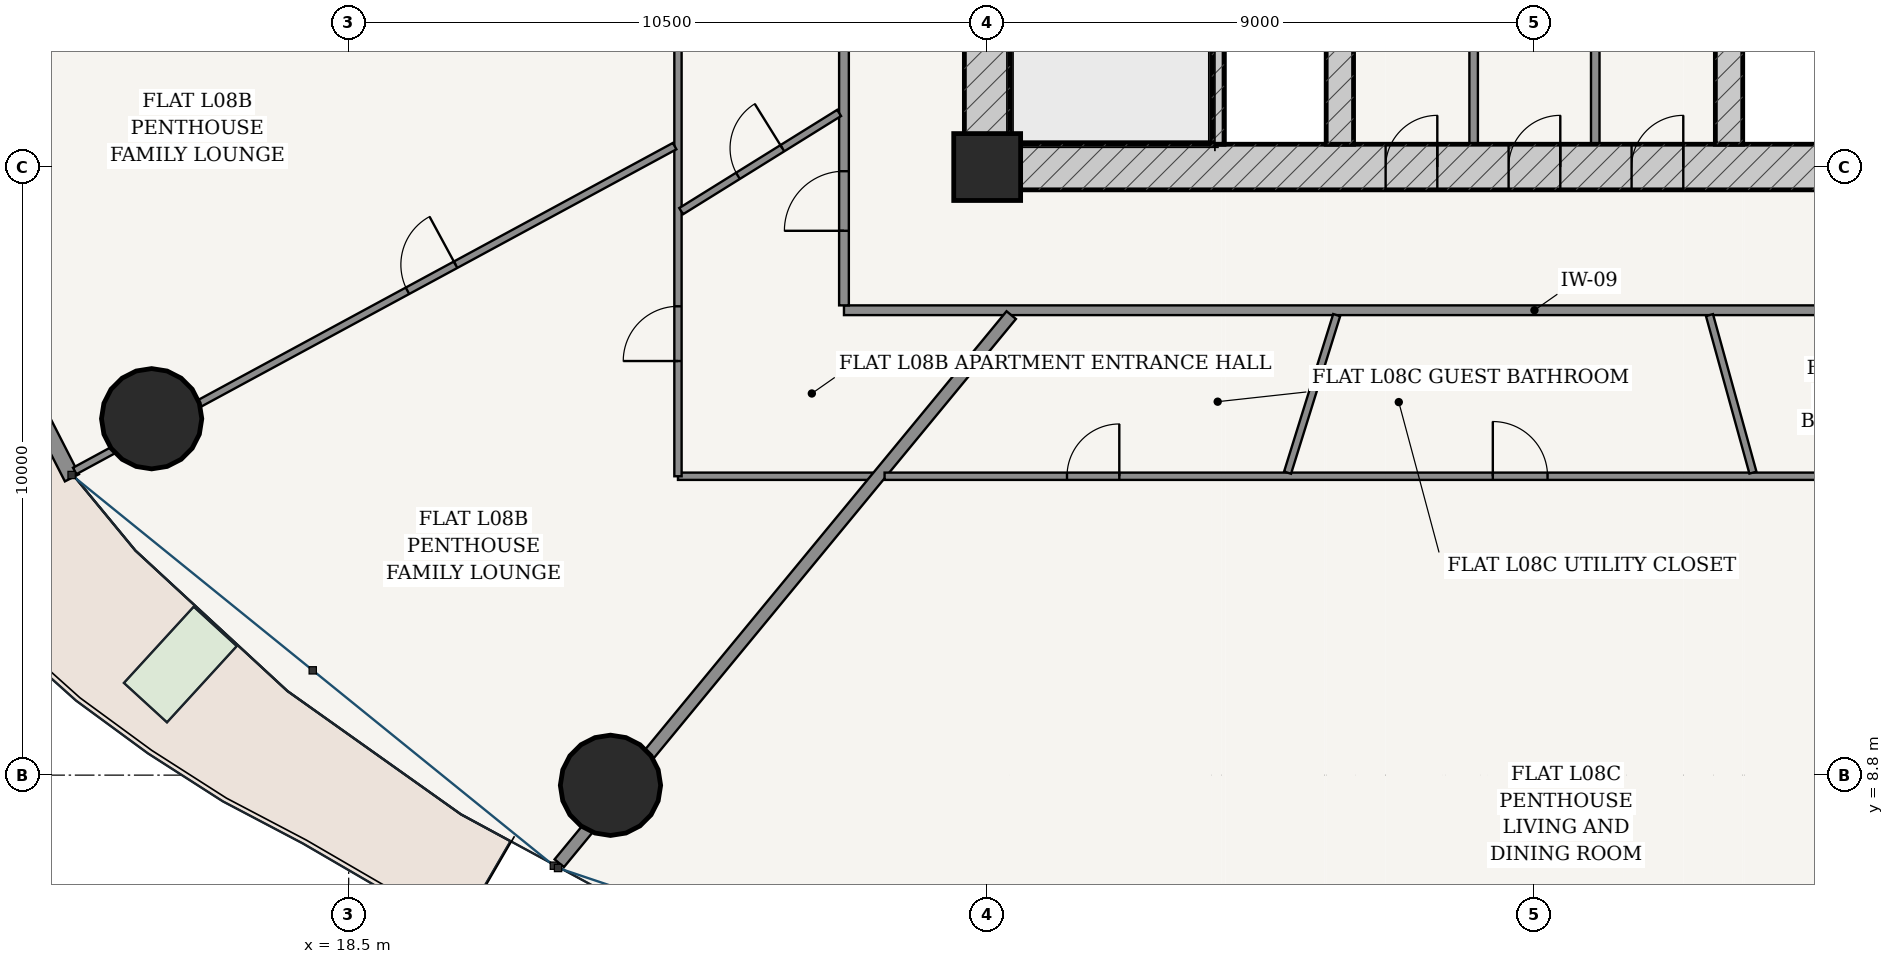
"""IFC4 building model, lengths in metres.
Left out: names, types, materials, properties, quantities, classifications, styles, units other than length and angle.
Written with IfcOpenShell. Run it as: python <this file> out.ifc"""

import sys

from ifc_helpers import new_model, si_unit, direction, frame, frame_2d, origin, origin_2d, place, context, subcontext, project, spatial, rectangle, hollow_circle, extrude, source, transform, mapped, element, fill, save


model = new_model("IFC4")
c1 = context("Model", 3, precision=1e-05, world=origin(), true_north=direction((-0.2419218956, 0.970295726276)))
c2 = subcontext(c1, "Body", "Model", "MODEL_VIEW")
j1 = project(units=[si_unit("LENGTHUNIT", "METRE"), si_unit("PLANEANGLEUNIT", "RADIAN")], contexts=[c1])
p1 = place(None, origin())
s1 = spatial("IfcSite", under=j1, at=p1, CompositionType="ELEMENT")
p2 = place(p1, origin())
s2 = spatial("IfcBuilding", under=s1, at=p2, CompositionType="ELEMENT")
p3 = place(p2, frame((0.0, 0.0, 34.8)))
s3 = spatial("IfcBuildingStorey", under=s2, at=p3, CompositionType="ELEMENT", Elevation=34.8)
p4 = place(p3, frame((29.0, 18.8, 0.0), z_axis=(0.0, 0.0, 1.0), x_axis=(1.0, 0.0, 0.0)))
e1 = element("IfcColumn", 1, at=p4, inside=s3, PredefinedType="COLUMN", context=c2, shape_type="SweptSolid", body=[
    extrude(rectangle(XDim=1.1, YDim=1.1, at=origin_2d()), origin(), (0.0, 0.0, 1.0), 3.6),
])
p5 = place(p3, frame((28.625, 18.8, 0.0), z_axis=(0.0, 0.0, 1.0), x_axis=(1.0, 0.0, 0.0)))
e2 = element("IfcWall", 2, at=p5, inside=s3, PredefinedType="SHEAR", context=c2, shape_type="SweptSolid", body=[
    extrude(rectangle(XDim=18.75, YDim=0.75, at=frame_2d((9.375, 0.0))), origin(), (0.0, 0.0, 1.0), 3.32),
])
p6 = place(p5, frame((6.927, 0.0, 0.0)))
e3 = element("IfcOpeningElement", 3, at=p6, cuts=e2, PredefinedType="OPENING", context=c2, shape_type="SweptSolid", body=[
    extrude(rectangle(XDim=0.85, YDim=2.1, at=frame_2d((0.425, 1.05))), frame((0.0, 0.385, 0.0), z_axis=(0.0, -1.0, 0.0), x_axis=(1.0, 0.0, 0.0)), (0.0, 0.0, 1.0), 0.77),
])
p7 = place(p5, frame((8.95, 0.0, 0.0)))
e4 = element("IfcOpeningElement", 4, at=p7, cuts=e2, PredefinedType="OPENING", context=c2, shape_type="SweptSolid", body=[
    extrude(rectangle(XDim=0.85, YDim=2.1, at=frame_2d((0.425, 1.05))), frame((0.0, 0.385, 0.0), z_axis=(0.0, -1.0, 0.0), x_axis=(1.0, 0.0, 0.0)), (0.0, 0.0, 1.0), 0.77),
])
p8 = place(p5, frame((10.972, 0.0, 0.0)))
e5 = element("IfcOpeningElement", 5, at=p8, cuts=e2, PredefinedType="OPENING", context=c2, shape_type="SweptSolid", body=[
    extrude(rectangle(XDim=0.85, YDim=2.1, at=frame_2d((0.425, 1.05))), frame((0.0, 0.385, 0.0), z_axis=(0.0, -1.0, 0.0), x_axis=(1.0, 0.0, 0.0)), (0.0, 0.0, 1.0), 0.77),
])
p9 = place(p3, frame((29.0, 19.175, 0.0), z_axis=(0.0, 0.0, 1.0), x_axis=(0.0, 1.0, 0.0)))
e6 = element("IfcWall", 6, at=p9, inside=s3, PredefinedType="SHEAR", context=c2, shape_type="SweptSolid", body=[
    extrude(rectangle(XDim=15.25, YDim=0.75, at=frame_2d((7.625, 0.0))), origin(), (0.0, 0.0, 1.0), 3.32),
])
p10 = place(p9, frame((9.875, 0.0, 0.0)))
e7 = element("IfcOpeningElement", 7, at=p10, cuts=e6, PredefinedType="OPENING", context=c2, shape_type="SweptSolid", body=[
    extrude(rectangle(XDim=1.5, YDim=2.2, at=frame_2d((0.75, 1.1))), frame((0.0, 0.385, 0.0), z_axis=(0.0, -1.0, 0.0), x_axis=(1.0, 0.0, 0.0)), (0.0, 0.0, 1.0), 0.77),
])
p11 = place(p3, frame((32.795, 19.175, 0.0), z_axis=(0.0, 0.0, 1.0), x_axis=(0.0, 1.0, 0.0)))
e8 = element("IfcWall", 8, at=p11, inside=s3, PredefinedType="SOLIDWALL", context=c2, shape_type="SweptSolid", body=[
    extrude(rectangle(XDim=7.375, YDim=0.2, at=frame_2d((3.688, 0.0))), origin(), (0.0, 0.0, 1.0), 3.32),
])
p12 = place(p3, frame((34.8, 19.175, 0.0), z_axis=(0.0, 0.0, 1.0), x_axis=(0.0, 1.0, 0.0)))
e9 = element("IfcWall", 9, at=p12, inside=s3, PredefinedType="SHEAR", context=c2, shape_type="SweptSolid", body=[
    extrude(rectangle(XDim=15.25, YDim=0.45, at=frame_2d((7.625, 0.0))), origin(), (0.0, 0.0, 1.0), 3.32),
])
p13 = place(p12, frame((7.8, 0.0, 0.0)))
e10 = element("IfcOpeningElement", 10, at=p13, cuts=e9, PredefinedType="OPENING", context=c2, shape_type="SweptSolid", body=[
    extrude(rectangle(XDim=1.05, YDim=2.15, at=frame_2d((0.525, 1.075))), frame((0.0, 0.235, 0.0), z_axis=(0.0, -1.0, 0.0), x_axis=(1.0, 0.0, 0.0)), (0.0, 0.0, 1.0), 0.47),
])
p14 = place(p3, frame((41.2, 19.175, 0.0), z_axis=(0.0, 0.0, 1.0), x_axis=(0.0, 1.0, 0.0)))
e11 = element("IfcWall", 11, at=p14, inside=s3, PredefinedType="SHEAR", context=c2, shape_type="SweptSolid", body=[
    extrude(rectangle(XDim=15.25, YDim=0.45, at=frame_2d((7.625, 0.0))), origin(), (0.0, 0.0, 1.0), 3.32),
])
p15 = place(p14, frame((7.8, 0.0, 0.0)))
e12 = element("IfcOpeningElement", 12, at=p15, cuts=e11, PredefinedType="OPENING", context=c2, shape_type="SweptSolid", body=[
    extrude(rectangle(XDim=1.05, YDim=2.15, at=frame_2d((0.525, 1.075))), frame((0.0, 0.235, 0.0), z_axis=(0.0, -1.0, 0.0), x_axis=(1.0, 0.0, 0.0)), (0.0, 0.0, 1.0), 0.47),
])
for number, where, z_axis, x_axis in (
    (13, (15.259, 14.661, 0.0), (0.0, 0.0, 1.0), (1.0, 0.0, 0.0)),
    (14, (22.805, 8.632, 0.0), (0.0, 0.0, 1.0), (1.0, 0.0, 0.0)),
):
    element("IfcColumn", number, at=place(p3, frame(where, z_axis=z_axis, x_axis=x_axis)), inside=s3, PredefinedType="COLUMN", context=c2, shape_type="SweptSolid", body=[
        extrude(hollow_circle(Radius=0.825, WallThickness=0.05, at=origin_2d()), origin(), (0.0, 0.0, 1.0), 3.6),
    ])
p16 = place(p3, frame((9.55, 22.292, 0.0), z_axis=(0.0, 0.0, 1.0), x_axis=(0.455220575541, -0.890378698984, 0.0)))
e15 = element("IfcWall", 15, at=p16, inside=s3, PredefinedType="SOLIDWALL", context=c2, shape_type="SweptSolid", body=[
    extrude(rectangle(XDim=9.662, YDim=0.26, at=frame_2d((4.831, 0.0))), origin(), (0.0, 0.0, 1.0), 3.32),
])
p17 = place(p16, frame((4.156, 0.0, 0.0)))
e16 = element("IfcOpeningElement", 16, at=p17, cuts=e15, PredefinedType="OPENING", context=c2, shape_type="SweptSolid", body=[
    extrude(rectangle(XDim=1.35, YDim=2.2, at=frame_2d((0.675, 1.1))), frame((0.0, 0.14, 0.0), z_axis=(0.0, -1.0, 0.0), x_axis=(1.0, 0.0, 0.0)), (0.0, 0.0, 1.0), 0.28),
])
p18 = place(p3, frame((37.0, 19.175, 0.0), z_axis=(0.0, 0.0, 1.0), x_axis=(0.0, 1.0, 0.0)))
e17 = element("IfcWall", 17, at=p18, inside=s3, PredefinedType="PARTITIONING", context=c2, shape_type="SweptSolid", body=[
    extrude(rectangle(XDim=4.465, YDim=0.14, at=frame_2d((2.232, 0.0))), origin(), (0.0, 0.0, 1.0), 3.32),
])
p19 = place(p18, frame((1.808, 0.0, 0.0)))
e18 = element("IfcOpeningElement", 18, at=p19, cuts=e17, PredefinedType="OPENING", context=c2, shape_type="SweptSolid", body=[
    extrude(rectangle(XDim=0.85, YDim=2.1, at=frame_2d((0.425, 1.05))), frame((0.0, 0.08, 0.0), z_axis=(0.0, -1.0, 0.0), x_axis=(1.0, 0.0, 0.0)), (0.0, 0.0, 1.0), 0.16),
])
p20 = place(p3, frame((39.0, 19.175, 0.0), z_axis=(0.0, 0.0, 1.0), x_axis=(0.0, 1.0, 0.0)))
e19 = element("IfcWall", 19, at=p20, inside=s3, PredefinedType="PARTITIONING", context=c2, shape_type="SweptSolid", body=[
    extrude(rectangle(XDim=4.465, YDim=0.14, at=frame_2d((2.232, 0.0))), origin(), (0.0, 0.0, 1.0), 3.32),
])
p21 = place(p20, frame((1.808, 0.0, 0.0)))
e20 = element("IfcOpeningElement", 20, at=p21, cuts=e19, PredefinedType="OPENING", context=c2, shape_type="SweptSolid", body=[
    extrude(rectangle(XDim=0.85, YDim=2.1, at=frame_2d((0.425, 1.05))), frame((0.0, 0.08, 0.0), z_axis=(0.0, -1.0, 0.0), x_axis=(1.0, 0.0, 0.0)), (0.0, 0.0, 1.0), 0.16),
])
p22 = place(p3, frame((26.645, 16.445, 0.0), z_axis=(0.0, 0.0, 1.0), x_axis=(1.0, 0.0, 0.0)))
e21 = element("IfcWall", 21, at=p22, inside=s3, PredefinedType="PARTITIONING", context=c2, shape_type="SweptSolid", body=[
    extrude(rectangle(XDim=22.71, YDim=0.16, at=frame_2d((11.355, 0.0))), origin(), (0.0, 0.0, 1.0), 2.688),
])
p23 = place(p3, frame((26.645, 16.525, 0.0), z_axis=(0.0, 0.0, 1.0), x_axis=(0.0, 1.0, 0.0)))
e22 = element("IfcWall", 22, at=p23, inside=s3, PredefinedType="PARTITIONING", context=c2, shape_type="SweptSolid", body=[
    extrude(rectangle(XDim=20.55, YDim=0.16, at=frame_2d((10.275, 0.0))), origin(), (0.0, 0.0, 1.0), 2.688),
])
p24 = place(p23, frame((1.226, 0.0, 0.0)))
e23 = element("IfcOpeningElement", 23, at=p24, cuts=e22, PredefinedType="OPENING", context=c2, shape_type="SweptSolid", body=[
    extrude(rectangle(XDim=0.98, YDim=2.2, at=frame_2d((0.49, 1.1))), frame((0.0, 0.09, 0.0), z_axis=(0.0, -1.0, 0.0), x_axis=(1.0, 0.0, 0.0)), (0.0, 0.0, 1.0), 0.18),
])
p25 = place(p3, frame((27.109, 13.715, 0.0), z_axis=(0.0, 0.0, 1.0), x_axis=(-1.0, 0.0, 0.0)))
e24 = element("IfcWall", 24, at=p25, inside=s3, PredefinedType="PARTITIONING", context=c2, shape_type="SweptSolid", body=[
    extrude(rectangle(XDim=3.194, YDim=0.12, at=frame_2d((1.597, 0.0))), origin(), (0.0, 0.0, 1.0), 2.688),
])
p26 = place(p3, frame((23.915, 13.715, 0.0), z_axis=(0.0, 0.0, 1.0), x_axis=(0.0, 1.0, 0.0)))
e25 = element("IfcWall", 25, at=p26, inside=s3, PredefinedType="PARTITIONING", context=c2, shape_type="SweptSolid", body=[
    extrude(rectangle(XDim=26.17, YDim=0.12, at=frame_2d((13.085, 0.0))), origin(), (0.0, 0.0, 1.0), 2.688),
])
p27 = place(p26, frame((1.895, 0.0, 0.0)))
e26 = element("IfcOpeningElement", 26, at=p27, cuts=e25, PredefinedType="OPENING", context=c2, shape_type="SweptSolid", body=[
    extrude(rectangle(XDim=0.9, YDim=2.15, at=frame_2d((0.45, 1.075))), frame((0.0, 0.07, 0.0), z_axis=(0.0, -1.0, 0.0), x_axis=(1.0, 0.0, 0.0)), (0.0, 0.0, 1.0), 0.14),
])
p28 = place(p26, frame((11.498, 0.0, 0.0)))
e27 = element("IfcOpeningElement", 27, at=p28, cuts=e25, PredefinedType="OPENING", context=c2, shape_type="SweptSolid", body=[
    extrude(rectangle(XDim=0.9, YDim=2.15, at=frame_2d((0.45, 1.075))), frame((0.0, 0.07, 0.0), z_axis=(0.0, -1.0, 0.0), x_axis=(1.0, 0.0, 0.0)), (0.0, 0.0, 1.0), 0.14),
])
p29 = place(p26, frame((23.831, 0.0, 0.0)))
e28 = element("IfcOpeningElement", 28, at=p29, cuts=e25, PredefinedType="OPENING", context=c2, shape_type="SweptSolid", body=[
    extrude(rectangle(XDim=0.86, YDim=2.15, at=frame_2d((0.43, 1.075))), frame((0.0, 0.07, 0.0), z_axis=(0.0, -1.0, 0.0), x_axis=(1.0, 0.0, 0.0)), (0.0, 0.0, 1.0), 0.14),
])
p30 = place(p3, frame((23.861, 19.144, 0.0), z_axis=(0.0, 0.0, 1.0), x_axis=(-0.879372452045, -0.476134529922, 0.0)))
e29 = element("IfcWall", 29, at=p30, inside=s3, PredefinedType="PARTITIONING", context=c2, shape_type="SweptSolid", body=[
    extrude(rectangle(XDim=11.219, YDim=0.12, at=frame_2d((5.61, 0.0))), origin(), (0.0, 0.0, 1.0), 2.688),
])
p31 = place(p30, frame((4.097, 0.0, 0.0)))
e30 = element("IfcOpeningElement", 30, at=p31, cuts=e29, PredefinedType="OPENING", context=c2, shape_type="SweptSolid", body=[
    extrude(rectangle(XDim=0.9, YDim=2.15, at=frame_2d((0.45, 1.075))), frame((0.0, 0.07, 0.0), z_axis=(0.0, -1.0, 0.0), x_axis=(1.0, 0.0, 0.0)), (0.0, 0.0, 1.0), 0.14),
])
p32 = place(p3, frame((26.565, 19.69, 0.0), z_axis=(0.0, 0.0, 1.0), x_axis=(-0.849229217796, -0.52802437031, 0.0)))
e31 = element("IfcWall", 31, at=p32, inside=s3, PredefinedType="PARTITIONING", context=c2, shape_type="SweptSolid", body=[
    extrude(rectangle(XDim=3.059, YDim=0.12, at=frame_2d((1.529, 0.0))), origin(), (0.0, 0.0, 1.0), 3.32),
])
p33 = place(p32, frame((1.099, 0.0, 0.0)))
e32 = element("IfcOpeningElement", 32, at=p33, cuts=e31, PredefinedType="OPENING", context=c2, shape_type="SweptSolid", body=[
    extrude(rectangle(XDim=0.86, YDim=2.15, at=frame_2d((0.43, 1.075))), frame((0.0, 0.07, 0.0), z_axis=(0.0, -1.0, 0.0), x_axis=(1.0, 0.0, 0.0)), (0.0, 0.0, 1.0), 0.14),
])
p34 = place(p3, frame((29.396, 16.365, 0.0), z_axis=(0.0, 0.0, 1.0), x_axis=(-0.636186165667, -0.771535587393, 0.0)))
e33 = element("IfcWall", 33, at=p34, inside=s3, PredefinedType="PARTITIONING", context=c2, shape_type="SweptSolid", body=[
    extrude(rectangle(XDim=11.683, YDim=0.2, at=frame_2d((5.842, 0.0))), origin(), (0.0, 0.0, 1.0), 2.688),
])
p35 = place(p3, frame((52.085, 13.715, 0.0), z_axis=(0.0, 0.0, 1.0), x_axis=(-1.0, 0.0, 0.0)))
e34 = element("IfcWall", 34, at=p35, inside=s3, PredefinedType="PARTITIONING", context=c2, shape_type="SweptSolid", body=[
    extrude(rectangle(XDim=24.772, YDim=0.12, at=frame_2d((12.386, 0.0))), origin(), (0.0, 0.0, 1.0), 2.688),
])
p36 = place(p35, frame((20.912, 0.0, 0.0)))
e35 = element("IfcOpeningElement", 35, at=p36, cuts=e34, PredefinedType="OPENING", context=c2, shape_type="SweptSolid", body=[
    extrude(rectangle(XDim=0.86, YDim=2.15, at=frame_2d((0.43, 1.075))), frame((0.0, 0.07, 0.0), z_axis=(0.0, -1.0, 0.0), x_axis=(1.0, 0.0, 0.0)), (0.0, 0.0, 1.0), 0.14),
])
p37 = place(p35, frame((13.87, 0.0, 0.0)))
e36 = element("IfcOpeningElement", 36, at=p37, cuts=e34, PredefinedType="OPENING", context=c2, shape_type="SweptSolid", body=[
    extrude(rectangle(XDim=0.9, YDim=2.15, at=frame_2d((0.45, 1.075))), frame((0.0, 0.07, 0.0), z_axis=(0.0, -1.0, 0.0), x_axis=(1.0, 0.0, 0.0)), (0.0, 0.0, 1.0), 0.14),
])
p38 = place(p3, frame((34.748, 16.365, 0.0), z_axis=(0.0, 0.0, 1.0), x_axis=(-0.297598752493, -0.954691040345, 0.0)))
e37 = element("IfcWall", 37, at=p38, inside=s3, PredefinedType="PARTITIONING", context=c2, shape_type="SweptSolid", body=[
    extrude(rectangle(XDim=2.714, YDim=0.12, at=frame_2d((1.357, 0.0))), origin(), (0.0, 0.0, 1.0), 3.32),
])
p39 = place(p3, frame((40.878, 16.365, 0.0), z_axis=(0.0, 0.0, 1.0), x_axis=(0.265853298244, -0.964013497734, 0.0)))
e38 = element("IfcWall", 38, at=p39, inside=s3, PredefinedType="PARTITIONING", context=c2, shape_type="SweptSolid", body=[
    extrude(rectangle(XDim=2.687, YDim=0.12, at=frame_2d((1.344, 0.0))), origin(), (0.0, 0.0, 1.0), 3.32),
])
m1 = source(origin(), c2, "Body", "SweptSolid", [
    extrude(rectangle(XDim=0.85, YDim=2.1, at=frame_2d((0.425, 1.05))), frame((0.0, 0.025, 0.0), z_axis=(0.0, -1.0, 0.0), x_axis=(1.0, 0.0, 0.0)), (0.0, 0.0, 1.0), 0.05),
])
p40 = place(p6, origin())
e39 = element("IfcDoor", 39, at=p40, inside=s3, OperationType="SINGLE_SWING_RIGHT", PredefinedType="DOOR", context=c2, shape_type="MappedRepresentation", body=[
    mapped(m1, transform((0.0, 0.0, 0.0), scale=1.0)),
])
fill(e3, e39)
p41 = place(p7, origin())
e40 = element("IfcDoor", 40, at=p41, inside=s3, OperationType="SINGLE_SWING_RIGHT", PredefinedType="DOOR", context=c2, shape_type="MappedRepresentation", body=[
    mapped(m1, transform((0.0, 0.0, 0.0), scale=1.0)),
])
fill(e4, e40)
p42 = place(p8, origin())
e41 = element("IfcDoor", 41, at=p42, inside=s3, OperationType="SINGLE_SWING_RIGHT", PredefinedType="DOOR", context=c2, shape_type="MappedRepresentation", body=[
    mapped(m1, transform((0.0, 0.0, 0.0), scale=1.0)),
])
fill(e5, e41)
m2 = source(origin(), c2, "Body", "SweptSolid", [
    extrude(rectangle(XDim=0.98, YDim=2.2, at=frame_2d((0.49, 1.1))), frame((0.0, 0.025, 0.0), z_axis=(0.0, -1.0, 0.0), x_axis=(1.0, 0.0, 0.0)), (0.0, 0.0, 1.0), 0.05),
])
p43 = place(p24, origin())
e42 = element("IfcDoor", 42, at=p43, inside=s3, OperationType="SINGLE_SWING_LEFT", PredefinedType="DOOR", context=c2, shape_type="MappedRepresentation", body=[
    mapped(m2, transform((0.0, 0.0, 0.0), scale=1.0)),
])
fill(e23, e42)
m3 = source(origin(), c2, "Body", "SweptSolid", [
    extrude(rectangle(XDim=0.86, YDim=2.15, at=frame_2d((0.43, 1.075))), frame((0.0, 0.025, 0.0), z_axis=(0.0, -1.0, 0.0), x_axis=(1.0, 0.0, 0.0)), (0.0, 0.0, 1.0), 0.05),
])
p44 = place(p33, frame((0.86, 0.0, 0.0), z_axis=(0.0, 0.0, 1.0), x_axis=(-1.0, 0.0, 0.0)))
e43 = element("IfcDoor", 43, at=p44, inside=s3, OperationType="SINGLE_SWING_RIGHT", PredefinedType="DOOR", context=c2, shape_type="MappedRepresentation", body=[
    mapped(m3, transform((0.0, 0.0, 0.0), scale=1.0)),
])
fill(e32, e43)
m4 = source(origin(), c2, "Body", "SweptSolid", [
    extrude(rectangle(XDim=0.9, YDim=2.15, at=frame_2d((0.45, 1.075))), frame((0.0, 0.025, 0.0), z_axis=(0.0, -1.0, 0.0), x_axis=(1.0, 0.0, 0.0)), (0.0, 0.0, 1.0), 0.05),
])
p45 = place(p27, origin())
e44 = element("IfcDoor", 44, at=p45, inside=s3, OperationType="SINGLE_SWING_LEFT", PredefinedType="DOOR", context=c2, shape_type="MappedRepresentation", body=[
    mapped(m4, transform((0.0, 0.0, 0.0), scale=1.0)),
])
fill(e26, e44)
p46 = place(p31, frame((0.9, 0.0, 0.0), z_axis=(0.0, 0.0, 1.0), x_axis=(-1.0, 0.0, 0.0)))
e45 = element("IfcDoor", 45, at=p46, inside=s3, OperationType="SINGLE_SWING_RIGHT", PredefinedType="DOOR", context=c2, shape_type="MappedRepresentation", body=[
    mapped(m4, transform((0.0, 0.0, 0.0), scale=1.0)),
])
fill(e30, e45)
p47 = place(p36, frame((0.86, 0.0, 0.0), z_axis=(0.0, 0.0, 1.0), x_axis=(-1.0, 0.0, 0.0)))
e46 = element("IfcDoor", 46, at=p47, inside=s3, OperationType="SINGLE_SWING_RIGHT", PredefinedType="DOOR", context=c2, shape_type="MappedRepresentation", body=[
    mapped(m3, transform((0.0, 0.0, 0.0), scale=1.0)),
])
fill(e35, e46)
p48 = place(p37, frame((0.9, 0.0, 0.0), z_axis=(0.0, 0.0, 1.0), x_axis=(-1.0, 0.0, 0.0)))
e47 = element("IfcDoor", 47, at=p48, inside=s3, OperationType="SINGLE_SWING_LEFT", PredefinedType="DOOR", context=c2, shape_type="MappedRepresentation", body=[
    mapped(m4, transform((0.0, 0.0, 0.0), scale=1.0)),
])
fill(e36, e47)
save(model, sys.argv[1])
